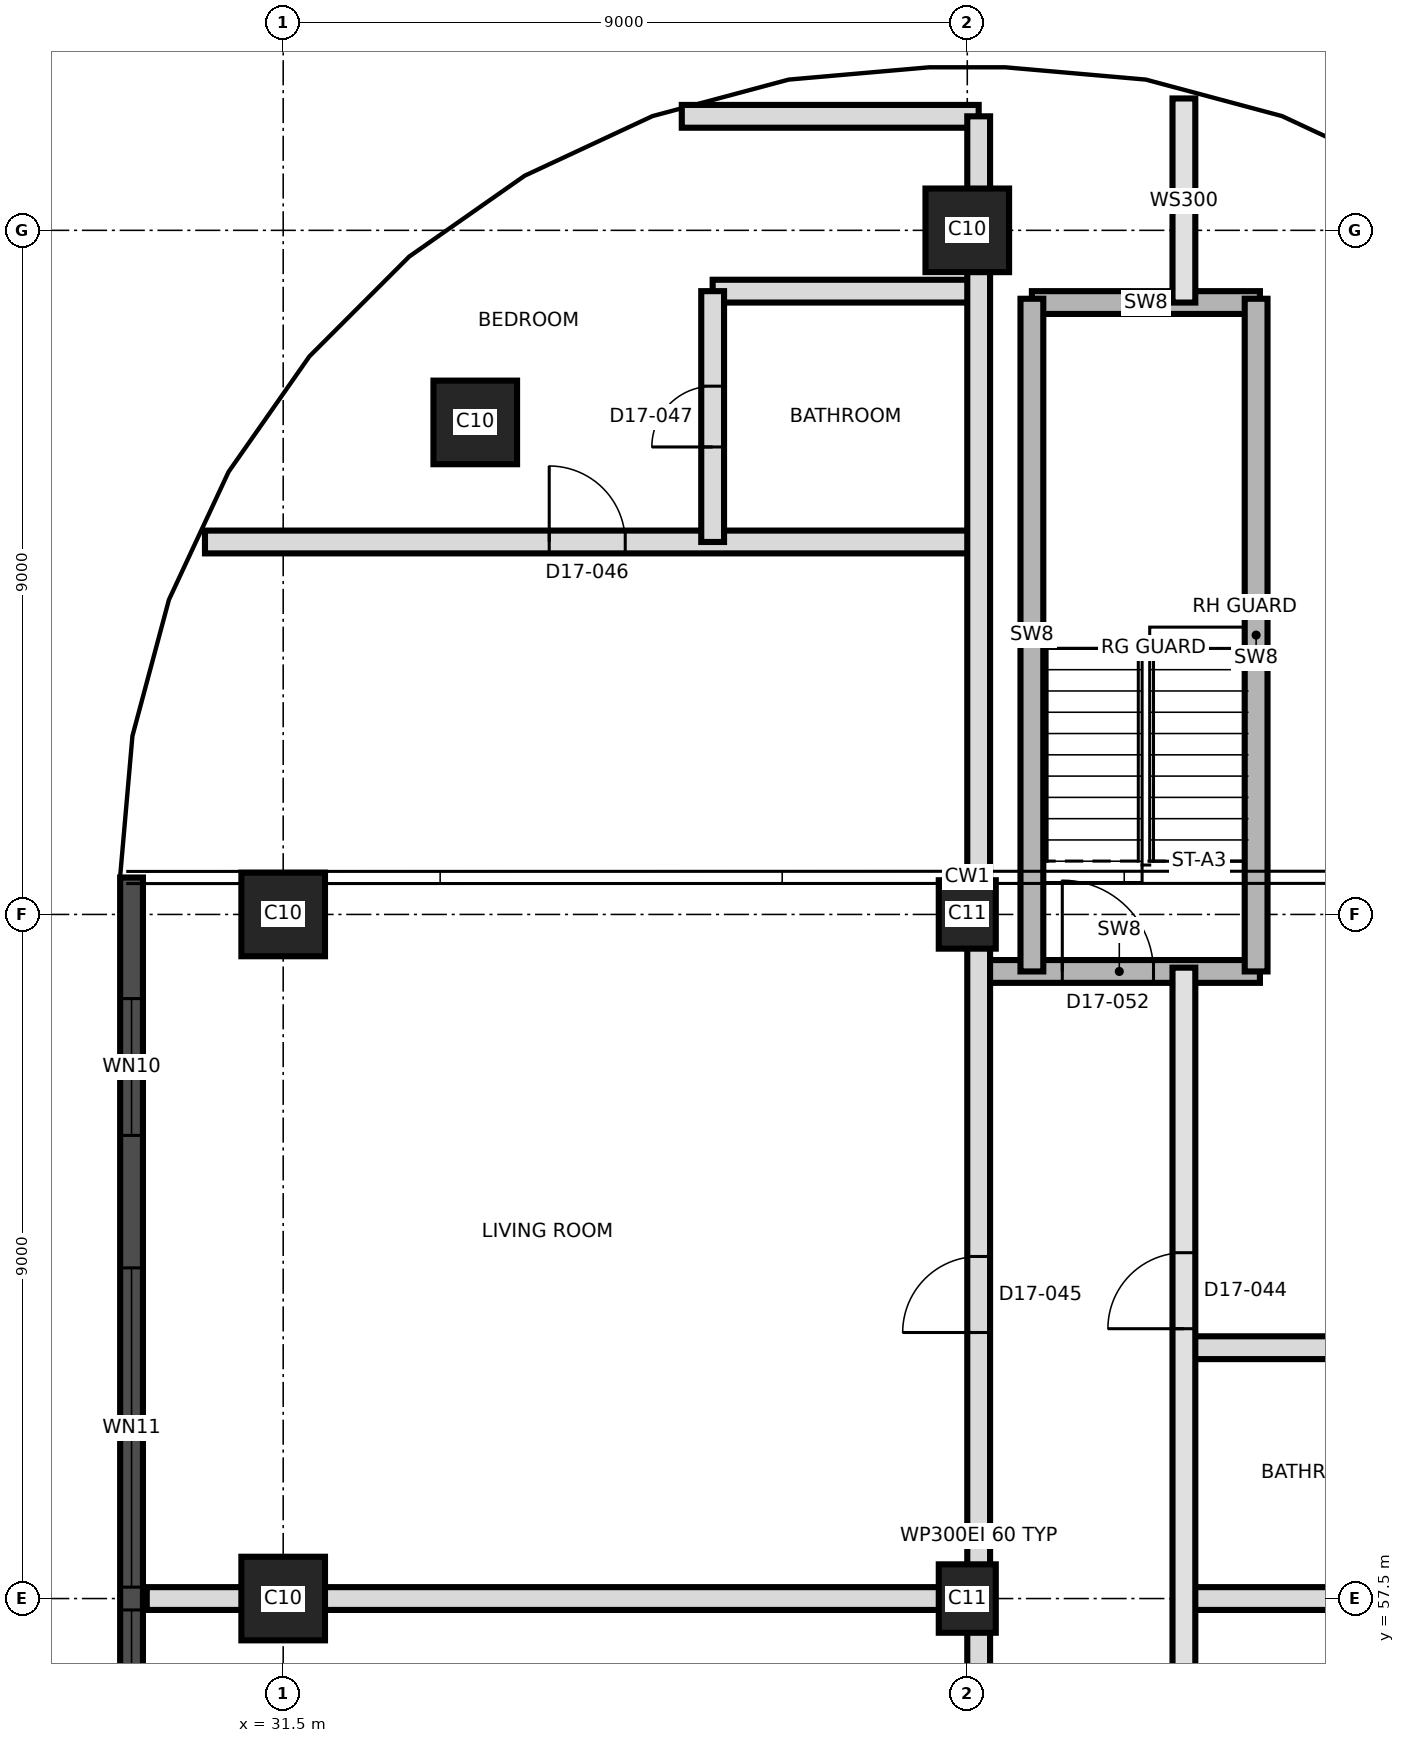
"""IFC4 building model, lengths in metres.
Left out: names, types, materials, properties, quantities, classifications, styles, units other than length and angle.
Written with IfcOpenShell. Run it as: python <this file> out.ifc"""

import sys

from ifc_helpers import new_model, si_unit, direction, frame, frame_2d, origin, origin_2d, place, context, subcontext, project, spatial, rectangle, extrude, element, fill, save


model = new_model("IFC4")
c1 = context("Model", 3, precision=1e-05, world=origin(), true_north=direction((0.0, 1.0)))
c2 = subcontext(c1, "Body", "Model", "MODEL_VIEW")
j1 = project(units=[si_unit("LENGTHUNIT", "METRE"), si_unit("PLANEANGLEUNIT", "RADIAN")], contexts=[c1])
p1 = place(None, origin())
s1 = spatial("IfcSite", under=j1, at=p1, CompositionType="ELEMENT")
p2 = place(p1, origin())
s2 = spatial("IfcBuilding", under=s1, at=p2, CompositionType="ELEMENT")
p3 = place(p2, frame((0.0, 0.0, 171.8)))
s3 = spatial("IfcBuildingStorey", under=s2, at=p3, CompositionType="ELEMENT", Elevation=171.8)
p4 = place(p3, frame((31.5, 57.5, 0.0), z_axis=(0.0, 0.0, 1.0), x_axis=(1.0, 0.0, 0.0)))
e1 = element("IfcColumn", 1, at=p4, inside=s3, PredefinedType="COLUMN", context=c2, shape_type="SweptSolid", body=[
    extrude(rectangle(XDim=1.1, YDim=1.1, at=origin_2d()), origin(), (0.0, 0.0, 1.0), 3.7),
])
p5 = place(p3, frame((40.5, 57.5, 0.0), z_axis=(0.0, 0.0, 1.0), x_axis=(0.0, 1.0, 0.0)))
e2 = element("IfcColumn", 2, at=p5, inside=s3, PredefinedType="COLUMN", context=c2, shape_type="SweptSolid", body=[
    extrude(rectangle(XDim=0.9, YDim=0.75, at=origin_2d()), origin(), (0.0, 0.0, 1.0), 3.7),
])
p6 = place(p3, frame((31.5, 66.5, 0.0), z_axis=(0.0, 0.0, 1.0), x_axis=(1.0, 0.0, 0.0)))
e3 = element("IfcColumn", 3, at=p6, inside=s3, PredefinedType="COLUMN", context=c2, shape_type="SweptSolid", body=[
    extrude(rectangle(XDim=1.1, YDim=1.1, at=origin_2d()), origin(), (0.0, 0.0, 1.0), 3.7),
])
p7 = place(p3, frame((40.5, 66.5, 0.0), z_axis=(0.0, 0.0, 1.0), x_axis=(0.0, 1.0, 0.0)))
e4 = element("IfcColumn", 4, at=p7, inside=s3, PredefinedType="COLUMN", context=c2, shape_type="SweptSolid", body=[
    extrude(rectangle(XDim=0.9, YDim=0.75, at=origin_2d()), origin(), (0.0, 0.0, 1.0), 3.7),
])
for number, where, z_axis, x_axis in (
    (5, (34.027, 72.973, 0.0), (0.0, 0.0, 1.0), (1.0, 0.0, 0.0)),
    (6, (40.5, 75.5, 0.0), (0.0, 0.0, 1.0), (1.0, 0.0, 0.0)),
):
    element("IfcColumn", number, at=place(p3, frame(where, z_axis=z_axis, x_axis=x_axis)), inside=s3, PredefinedType="COLUMN", context=c2, shape_type="SweptSolid", body=[
        extrude(rectangle(XDim=1.1, YDim=1.1, at=origin_2d()), origin(), (0.0, 0.0, 1.0), 3.7),
    ])
p8 = place(p3, frame((29.505, 66.986, 0.0), z_axis=(0.0, 0.0, 1.0), x_axis=(0.0, -1.0, 0.0)))
e7 = element("IfcWall", 7, at=p8, inside=s3, PredefinedType="SOLIDWALL", context=c2, shape_type="SweptSolid", body=[
    extrude(rectangle(XDim=32.976, YDim=0.3, at=frame_2d((16.488, 0.0))), origin(), (0.0, 0.0, 1.0), 3.4),
])
p9 = place(p8, frame((1.593, 0.0, 0.3)))
e8 = element("IfcOpeningElement", 8, at=p9, cuts=e7, PredefinedType="OPENING", context=c2, shape_type="SweptSolid", body=[
    extrude(rectangle(XDim=1.8, YDim=2.4, at=frame_2d((0.9, 1.2))), frame((0.0, 0.16, 0.0), z_axis=(0.0, -1.0, 0.0), x_axis=(1.0, 0.0, 0.0)), (0.0, 0.0, 1.0), 0.32),
])
p10 = place(p8, frame((5.136, 0.0, 0.9)))
e9 = element("IfcOpeningElement", 9, at=p10, cuts=e7, PredefinedType="OPENING", context=c2, shape_type="SweptSolid", body=[
    extrude(rectangle(XDim=4.2, YDim=1.5, at=frame_2d((2.1, 0.75))), frame((0.0, 0.16, 0.0), z_axis=(0.0, -1.0, 0.0), x_axis=(1.0, 0.0, 0.0)), (0.0, 0.0, 1.0), 0.32),
])
p11 = place(p8, frame((9.636, 0.0, 0.9)))
e10 = element("IfcOpeningElement", 10, at=p11, cuts=e7, PredefinedType="OPENING", context=c2, shape_type="SweptSolid", body=[
    extrude(rectangle(XDim=4.2, YDim=1.5, at=frame_2d((2.1, 0.75))), frame((0.0, 0.16, 0.0), z_axis=(0.0, -1.0, 0.0), x_axis=(1.0, 0.0, 0.0)), (0.0, 0.0, 1.0), 0.32),
])
p12 = place(p8, frame((14.136, 0.0, 0.9)))
e11 = element("IfcOpeningElement", 11, at=p12, cuts=e7, PredefinedType="OPENING", context=c2, shape_type="SweptSolid", body=[
    extrude(rectangle(XDim=4.2, YDim=1.5, at=frame_2d((2.1, 0.75))), frame((0.0, 0.16, 0.0), z_axis=(0.0, -1.0, 0.0), x_axis=(1.0, 0.0, 0.0)), (0.0, 0.0, 1.0), 0.32),
])
p13 = place(p8, frame((18.636, 0.0, 0.9)))
e12 = element("IfcOpeningElement", 12, at=p13, cuts=e7, PredefinedType="OPENING", context=c2, shape_type="SweptSolid", body=[
    extrude(rectangle(XDim=4.2, YDim=1.5, at=frame_2d((2.1, 0.75))), frame((0.0, 0.16, 0.0), z_axis=(0.0, -1.0, 0.0), x_axis=(1.0, 0.0, 0.0)), (0.0, 0.0, 1.0), 0.32),
])
p14 = place(p8, frame((23.136, 0.0, 0.9)))
e13 = element("IfcOpeningElement", 13, at=p14, cuts=e7, PredefinedType="OPENING", context=c2, shape_type="SweptSolid", body=[
    extrude(rectangle(XDim=4.2, YDim=1.5, at=frame_2d((2.1, 0.75))), frame((0.0, 0.16, 0.0), z_axis=(0.0, -1.0, 0.0), x_axis=(1.0, 0.0, 0.0)), (0.0, 0.0, 1.0), 0.32),
])
p15 = place(p8, frame((29.331, 0.0, 0.3)))
e14 = element("IfcOpeningElement", 14, at=p15, cuts=e7, PredefinedType="OPENING", context=c2, shape_type="SweptSolid", body=[
    extrude(rectangle(XDim=1.8, YDim=2.4, at=frame_2d((0.9, 1.2))), frame((0.0, 0.16, 0.0), z_axis=(0.0, -1.0, 0.0), x_axis=(1.0, 0.0, 0.0)), (0.0, 0.0, 1.0), 0.32),
])
p16 = place(p3, frame((29.705, 57.5, 0.0), z_axis=(0.0, 0.0, 1.0), x_axis=(1.0, 0.0, 0.0)))
e15 = element("IfcWall", 15, at=p16, inside=s3, PredefinedType="PARTITIONING", context=c2, shape_type="SweptSolid", body=[
    extrude(rectangle(XDim=10.945, YDim=0.3, at=frame_2d((5.472, 0.0))), origin(), (0.0, 0.0, 1.0), 3.4),
])
p17 = place(p3, frame((43.35, 57.5, 0.0), z_axis=(0.0, 0.0, 1.0), x_axis=(1.0, 0.0, 0.0)))
e16 = element("IfcWall", 16, at=p17, inside=s3, PredefinedType="PARTITIONING", context=c2, shape_type="SweptSolid", body=[
    extrude(rectangle(XDim=8.125, YDim=0.3, at=frame_2d((4.062, 0.0))), origin(), (0.0, 0.0, 1.0), 3.4),
])
p18 = place(p3, frame((43.35, 60.8, 0.0), z_axis=(0.0, 0.0, 1.0), x_axis=(1.0, 0.0, 0.0)))
e17 = element("IfcWall", 17, at=p18, inside=s3, PredefinedType="PARTITIONING", context=c2, shape_type="SweptSolid", body=[
    extrude(rectangle(XDim=3.5, YDim=0.3, at=frame_2d((1.75, 0.0))), origin(), (0.0, 0.0, 1.0), 3.4),
])
p19 = place(p3, frame((40.65, 65.75, 0.0), z_axis=(0.0, 0.0, 1.0), x_axis=(1.0, 0.0, 0.0)))
e18 = element("IfcWall", 18, at=p19, inside=s3, PredefinedType="SHEAR", context=c2, shape_type="SweptSolid", body=[
    extrude(rectangle(XDim=3.7, YDim=0.3, at=frame_2d((1.85, 0.0))), origin(), (0.0, 0.0, 1.0), 3.4),
])
p20 = place(p19, frame((1.1, 0.0, 0.0)))
e19 = element("IfcOpeningElement", 19, at=p20, cuts=e18, PredefinedType="OPENING", context=c2, shape_type="SweptSolid", body=[
    extrude(rectangle(XDim=1.2, YDim=2.1, at=frame_2d((0.6, 1.05))), frame((0.0, 0.16, 0.0), z_axis=(0.0, -1.0, 0.0), x_axis=(1.0, 0.0, 0.0)), (0.0, 0.0, 1.0), 0.32),
])
p21 = place(p3, frame((30.471, 71.4, 0.0), z_axis=(0.0, 0.0, 1.0), x_axis=(1.0, 0.0, 0.0)))
e20 = element("IfcWall", 20, at=p21, inside=s3, PredefinedType="PARTITIONING", context=c2, shape_type="SweptSolid", body=[
    extrude(rectangle(XDim=10.179, YDim=0.3, at=frame_2d((5.089, 0.0))), origin(), (0.0, 0.0, 1.0), 3.4),
])
p22 = place(p21, frame((4.529, 0.0, 0.0)))
e21 = element("IfcOpeningElement", 21, at=p22, cuts=e20, PredefinedType="OPENING", context=c2, shape_type="SweptSolid", body=[
    extrude(rectangle(XDim=1.0, YDim=2.1, at=frame_2d((0.5, 1.05))), frame((0.0, 0.16, 0.0), z_axis=(0.0, -1.0, 0.0), x_axis=(1.0, 0.0, 0.0)), (0.0, 0.0, 1.0), 0.32),
])
p23 = place(p3, frame((41.35, 74.55, 0.0), z_axis=(0.0, 0.0, 1.0), x_axis=(1.0, 0.0, 0.0)))
e22 = element("IfcWall", 22, at=p23, inside=s3, PredefinedType="SHEAR", context=c2, shape_type="SweptSolid", body=[
    extrude(rectangle(XDim=3.0, YDim=0.3, at=frame_2d((1.5, 0.0))), origin(), (0.0, 0.0, 1.0), 3.4),
])
p24 = place(p3, frame((37.15, 74.7, 0.0), z_axis=(0.0, 0.0, 1.0), x_axis=(1.0, 0.0, 0.0)))
e23 = element("IfcWall", 23, at=p24, inside=s3, PredefinedType="PARTITIONING", context=c2, shape_type="SweptSolid", body=[
    extrude(rectangle(XDim=3.5, YDim=0.3, at=frame_2d((1.75, 0.0))), origin(), (0.0, 0.0, 1.0), 3.4),
])
p25 = place(p3, frame((36.744, 77.0, 0.0), z_axis=(0.0, 0.0, 1.0), x_axis=(1.0, 0.0, 0.0)))
e24 = element("IfcWall", 24, at=p25, inside=s3, PredefinedType="PARTITIONING", context=c2, shape_type="SweptSolid", body=[
    extrude(rectangle(XDim=3.906, YDim=0.3, at=frame_2d((1.953, 0.0))), origin(), (0.0, 0.0, 1.0), 3.4),
])
p26 = place(p3, frame((37.15, 71.4, 0.0), z_axis=(0.0, 0.0, 1.0), x_axis=(0.0, 1.0, 0.0)))
e25 = element("IfcWall", 25, at=p26, inside=s3, PredefinedType="PARTITIONING", context=c2, shape_type="SweptSolid", body=[
    extrude(rectangle(XDim=3.3, YDim=0.3, at=frame_2d((1.65, 0.0))), origin(), (0.0, 0.0, 1.0), 3.4),
])
p27 = place(p26, frame((1.25, 0.0, 0.0)))
e26 = element("IfcOpeningElement", 26, at=p27, cuts=e25, PredefinedType="OPENING", context=c2, shape_type="SweptSolid", body=[
    extrude(rectangle(XDim=0.8, YDim=2.1, at=frame_2d((0.4, 1.05))), frame((0.0, 0.16, 0.0), z_axis=(0.0, -1.0, 0.0), x_axis=(1.0, 0.0, 0.0)), (0.0, 0.0, 1.0), 0.32),
])
p28 = place(p3, frame((40.65, 39.65, 0.0), z_axis=(0.0, 0.0, 1.0), x_axis=(0.0, 1.0, 0.0)))
e27 = element("IfcWall", 27, at=p28, inside=s3, PredefinedType="PARTITIONING", context=c2, shape_type="SweptSolid", body=[
    extrude(rectangle(XDim=37.35, YDim=0.3, at=frame_2d((18.675, 0.0))), origin(), (0.0, 0.0, 1.0), 3.4),
])
p29 = place(p28, frame((1.0, 0.0, 0.0)))
e28 = element("IfcOpeningElement", 28, at=p29, cuts=e27, PredefinedType="OPENING", context=c2, shape_type="SweptSolid", body=[
    extrude(rectangle(XDim=1.0, YDim=2.1, at=frame_2d((0.5, 1.05))), frame((0.0, 0.16, 0.0), z_axis=(0.0, -1.0, 0.0), x_axis=(1.0, 0.0, 0.0)), (0.0, 0.0, 1.0), 0.32),
])
p30 = place(p28, frame((6.85, 0.0, 0.0)))
e29 = element("IfcOpeningElement", 29, at=p30, cuts=e27, PredefinedType="OPENING", context=c2, shape_type="SweptSolid", body=[
    extrude(rectangle(XDim=1.0, YDim=2.1, at=frame_2d((0.5, 1.05))), frame((0.0, 0.16, 0.0), z_axis=(0.0, -1.0, 0.0), x_axis=(1.0, 0.0, 0.0)), (0.0, 0.0, 1.0), 0.32),
])
p31 = place(p28, frame((14.5, 0.0, 0.0)))
e30 = element("IfcOpeningElement", 30, at=p31, cuts=e27, PredefinedType="OPENING", context=c2, shape_type="SweptSolid", body=[
    extrude(rectangle(XDim=1.0, YDim=2.4, at=frame_2d((0.5, 1.2))), frame((0.0, 0.16, 0.0), z_axis=(0.0, -1.0, 0.0), x_axis=(1.0, 0.0, 0.0)), (0.0, 0.0, 1.0), 0.32),
])
p32 = place(p28, frame((21.35, 0.0, 0.0)))
e31 = element("IfcOpeningElement", 31, at=p32, cuts=e27, PredefinedType="OPENING", context=c2, shape_type="SweptSolid", body=[
    extrude(rectangle(XDim=1.0, YDim=2.4, at=frame_2d((0.5, 1.2))), frame((0.0, 0.16, 0.0), z_axis=(0.0, -1.0, 0.0), x_axis=(1.0, 0.0, 0.0)), (0.0, 0.0, 1.0), 0.32),
])
p33 = place(p3, frame((41.35, 65.75, 0.0), z_axis=(0.0, 0.0, 1.0), x_axis=(0.0, 1.0, 0.0)))
e32 = element("IfcWall", 32, at=p33, inside=s3, PredefinedType="SHEAR", context=c2, shape_type="SweptSolid", body=[
    extrude(rectangle(XDim=8.85, YDim=0.3, at=frame_2d((4.425, 0.0))), origin(), (0.0, 0.0, 1.0), 3.4),
])
p34 = place(p3, frame((43.35, 39.65, 0.0), z_axis=(0.0, 0.0, 1.0), x_axis=(0.0, 1.0, 0.0)))
e33 = element("IfcWall", 33, at=p34, inside=s3, PredefinedType="SOLIDWALL", context=c2, shape_type="SweptSolid", body=[
    extrude(rectangle(XDim=26.15, YDim=0.3, at=frame_2d((13.075, 0.0))), origin(), (0.0, 0.0, 1.0), 3.4),
])
p35 = place(p34, frame((3.85, 0.0, 0.0)))
e34 = element("IfcOpeningElement", 34, at=p35, cuts=e33, PredefinedType="OPENING", context=c2, shape_type="SweptSolid", body=[
    extrude(rectangle(XDim=1.0, YDim=2.4, at=frame_2d((0.5, 1.2))), frame((0.0, 0.16, 0.0), z_axis=(0.0, -1.0, 0.0), x_axis=(1.0, 0.0, 0.0)), (0.0, 0.0, 1.0), 0.32),
])
p36 = place(p34, frame((12.265, 0.0, 0.0)))
e35 = element("IfcOpeningElement", 35, at=p36, cuts=e33, PredefinedType="OPENING", context=c2, shape_type="SweptSolid", body=[
    extrude(rectangle(XDim=1.0, YDim=2.1, at=frame_2d((0.5, 1.05))), frame((0.0, 0.16, 0.0), z_axis=(0.0, -1.0, 0.0), x_axis=(1.0, 0.0, 0.0)), (0.0, 0.0, 1.0), 0.32),
])
p37 = place(p34, frame((15.215, 0.0, 0.0)))
e36 = element("IfcOpeningElement", 36, at=p37, cuts=e33, PredefinedType="OPENING", context=c2, shape_type="SweptSolid", body=[
    extrude(rectangle(XDim=1.4, YDim=2.1, at=frame_2d((0.7, 1.05))), frame((0.0, 0.16, 0.0), z_axis=(0.0, -1.0, 0.0), x_axis=(1.0, 0.0, 0.0)), (0.0, 0.0, 1.0), 0.32),
])
p38 = place(p34, frame((21.4, 0.0, 0.0)))
e37 = element("IfcOpeningElement", 37, at=p38, cuts=e33, PredefinedType="OPENING", context=c2, shape_type="SweptSolid", body=[
    extrude(rectangle(XDim=1.0, YDim=2.4, at=frame_2d((0.5, 1.2))), frame((0.0, 0.16, 0.0), z_axis=(0.0, -1.0, 0.0), x_axis=(1.0, 0.0, 0.0)), (0.0, 0.0, 1.0), 0.32),
])
p39 = place(p3, frame((43.35, 74.55, 0.0), z_axis=(0.0, 0.0, 1.0), x_axis=(0.0, 1.0, 0.0)))
e38 = element("IfcWall", 38, at=p39, inside=s3, PredefinedType="SOLIDWALL", context=c2, shape_type="SweptSolid", body=[
    extrude(rectangle(XDim=2.685, YDim=0.3, at=frame_2d((1.343, 0.0))), origin(), (0.0, 0.0, 1.0), 3.4),
])
p40 = place(p3, frame((44.3, 65.75, 0.0), z_axis=(0.0, 0.0, 1.0), x_axis=(0.0, 1.0, 0.0)))
e39 = element("IfcWall", 39, at=p40, inside=s3, PredefinedType="SHEAR", context=c2, shape_type="SweptSolid", body=[
    extrude(rectangle(XDim=8.85, YDim=0.3, at=frame_2d((4.425, 0.0))), origin(), (0.0, 0.0, 1.0), 3.4),
])
p41 = place(p9, origin())
e40 = element("IfcWindow", 40, at=p41, inside=s3, PartitioningType="SINGLE_PANEL", PredefinedType="WINDOW", context=c2, shape_type="SweptSolid", body=[
    extrude(rectangle(XDim=1.8, YDim=2.4, at=frame_2d((0.9, 1.2))), frame((0.0, 0.03, 0.0), z_axis=(0.0, -1.0, 0.0), x_axis=(1.0, 0.0, 0.0)), (0.0, 0.0, 1.0), 0.06),
])
fill(e8, e40)
p42 = place(p10, origin())
e41 = element("IfcWindow", 41, at=p42, inside=s3, PartitioningType="SINGLE_PANEL", PredefinedType="WINDOW", context=c2, shape_type="SweptSolid", body=[
    extrude(rectangle(XDim=4.2, YDim=1.5, at=frame_2d((2.1, 0.75))), frame((0.0, 0.03, 0.0), z_axis=(0.0, -1.0, 0.0), x_axis=(1.0, 0.0, 0.0)), (0.0, 0.0, 1.0), 0.06),
])
fill(e9, e41)
p43 = place(p11, origin())
e42 = element("IfcWindow", 42, at=p43, inside=s3, PartitioningType="SINGLE_PANEL", PredefinedType="WINDOW", context=c2, shape_type="SweptSolid", body=[
    extrude(rectangle(XDim=4.2, YDim=1.5, at=frame_2d((2.1, 0.75))), frame((0.0, 0.03, 0.0), z_axis=(0.0, -1.0, 0.0), x_axis=(1.0, 0.0, 0.0)), (0.0, 0.0, 1.0), 0.06),
])
fill(e10, e42)
p44 = place(p38, origin())
e43 = element("IfcDoor", 43, at=p44, inside=s3, OperationType="SINGLE_SWING_RIGHT", PredefinedType="DOOR", context=c2, shape_type="SweptSolid", body=[
    extrude(rectangle(XDim=1.0, YDim=2.4, at=frame_2d((0.5, 1.2))), frame((0.0, 0.025, 0.0), z_axis=(0.0, -1.0, 0.0), x_axis=(1.0, 0.0, 0.0)), (0.0, 0.0, 1.0), 0.05),
])
fill(e37, e43)
p45 = place(p32, origin())
e44 = element("IfcDoor", 44, at=p45, inside=s3, OperationType="SINGLE_SWING_LEFT", PredefinedType="DOOR", context=c2, shape_type="SweptSolid", body=[
    extrude(rectangle(XDim=1.0, YDim=2.4, at=frame_2d((0.5, 1.2))), frame((0.0, 0.025, 0.0), z_axis=(0.0, -1.0, 0.0), x_axis=(1.0, 0.0, 0.0)), (0.0, 0.0, 1.0), 0.05),
])
fill(e31, e44)
p46 = place(p22, origin())
e45 = element("IfcDoor", 45, at=p46, inside=s3, OperationType="SINGLE_SWING_RIGHT", PredefinedType="DOOR", context=c2, shape_type="SweptSolid", body=[
    extrude(rectangle(XDim=1.0, YDim=2.1, at=frame_2d((0.5, 1.05))), frame((0.0, 0.025, 0.0), z_axis=(0.0, -1.0, 0.0), x_axis=(1.0, 0.0, 0.0)), (0.0, 0.0, 1.0), 0.05),
])
fill(e21, e45)
p47 = place(p27, origin())
e46 = element("IfcDoor", 46, at=p47, inside=s3, OperationType="SINGLE_SWING_LEFT", PredefinedType="DOOR", context=c2, shape_type="SweptSolid", body=[
    extrude(rectangle(XDim=0.8, YDim=2.1, at=frame_2d((0.4, 1.05))), frame((0.0, 0.025, 0.0), z_axis=(0.0, -1.0, 0.0), x_axis=(1.0, 0.0, 0.0)), (0.0, 0.0, 1.0), 0.05),
])
fill(e26, e46)
p48 = place(p20, origin())
e47 = element("IfcDoor", 47, at=p48, inside=s3, OperationType="SINGLE_SWING_RIGHT", PredefinedType="DOOR", context=c2, shape_type="SweptSolid", body=[
    extrude(rectangle(XDim=1.2, YDim=2.1, at=frame_2d((0.6, 1.05))), frame((0.0, 0.025, 0.0), z_axis=(0.0, -1.0, 0.0), x_axis=(1.0, 0.0, 0.0)), (0.0, 0.0, 1.0), 0.05),
])
fill(e19, e47)
save(model, sys.argv[1])
